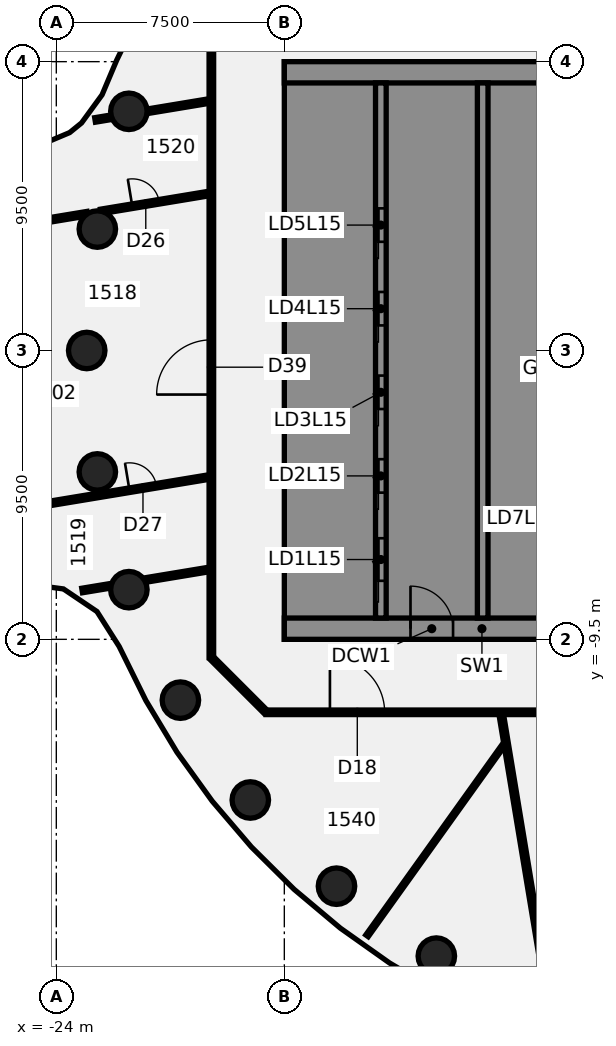
"""IFC4 building model, lengths in metres.
Left out: names, types, materials, properties, quantities, classifications, styles, units other than length and angle.
Written with IfcOpenShell. Run it as: python <this file> out.ifc"""

import sys

from ifc_helpers import new_model, si_unit, direction, frame, frame_2d, origin, origin_2d, place, context, subcontext, project, spatial, polyline, rectangle, circle, outline, extrude, element, fill, save


model = new_model("IFC4")
c1 = context("Model", 3, precision=1e-05, world=origin(), true_north=direction((0.0, 1.0)))
c2 = subcontext(c1, "Body", "Model", "MODEL_VIEW")
j1 = project(units=[si_unit("LENGTHUNIT", "METRE"), si_unit("PLANEANGLEUNIT", "RADIAN")], contexts=[c1])
p1 = place(None, origin())
s1 = spatial("IfcSite", under=j1, at=p1, CompositionType="ELEMENT")
p2 = place(p1, origin())
s2 = spatial("IfcBuilding", under=s1, at=p2, CompositionType="ELEMENT")
p3 = place(p2, frame((0.0, 0.0, 67.75)))
s3 = spatial("IfcBuildingStorey", under=s2, at=p3, CompositionType="ELEMENT", Elevation=67.75)
for number, where, z_axis, x_axis in (
    (1, (-21.613, 7.866, -0.14), (0.0, 0.0, 1.0), (1.0, 0.0, 0.0)),
    (2, (-22.651, 3.994, -0.14), (0.0, 0.0, 1.0), (1.0, 0.0, 0.0)),
    (3, (-23.0, 0.0, -0.14), (0.0, 0.0, 1.0), (1.0, 0.0, 0.0)),
    (4, (-22.651, -3.994, -0.14), (0.0, 0.0, 1.0), (1.0, 0.0, 0.0)),
    (5, (-21.613, -7.866, -0.14), (0.0, 0.0, 1.0), (1.0, 0.0, 0.0)),
    (6, (-19.919, -11.5, -0.14), (0.0, 0.0, 1.0), (1.0, 0.0, 0.0)),
    (7, (-17.619, -14.784, -0.14), (0.0, 0.0, 1.0), (1.0, 0.0, 0.0)),
    (8, (-14.784, -17.619, -0.14), (0.0, 0.0, 1.0), (1.0, 0.0, 0.0)),
    (9, (-11.5, -19.919, -0.14), (0.0, 0.0, 1.0), (1.0, 0.0, 0.0)),
):
    element("IfcColumn", number, at=place(p3, frame(where, z_axis=z_axis, x_axis=x_axis)), inside=s3, PredefinedType="COLUMN", context=c2, shape_type="SweptSolid", body=[
        extrude(circle(Radius=0.6, at=origin_2d()), origin(), (0.0, 0.0, 1.0), 3.75),
    ])
p4 = place(p3, frame((-9.365, -11.969, 0.0), z_axis=(0.0, 0.0, 1.0), x_axis=(0.163235943674, -0.986587059865, 0.0)))
e10 = element("IfcWall", 10, at=p4, inside=s3, PredefinedType="PARTITIONING", context=c2, shape_type="SweptSolid", body=[
    extrude(rectangle(XDim=9.158, YDim=0.15, at=frame_2d((4.579, 0.0))), origin(), (0.0, 0.0, 1.0), 3.01),
])
p5 = place(p3, frame((-18.872, -10.128, 0.0), z_axis=(0.0, 0.0, 1.0), x_axis=(0.707106781187, -0.707106781187, 0.0)))
e11 = element("IfcWall", 11, at=p5, inside=s3, PredefinedType="PARTITIONING", context=c2, shape_type="SweptSolid", body=[
    extrude(rectangle(XDim=2.465, YDim=0.15, at=frame_2d((1.232, 0.0))), origin(), (0.0, 0.0, 1.0), 3.01),
])
p6 = place(p3, frame((-17.1, -11.9, 0.0), z_axis=(0.0, 0.0, 1.0), x_axis=(1.0, 0.0, 0.0)))
e12 = element("IfcWall", 12, at=p6, inside=s3, PredefinedType="PARTITIONING", context=c2, shape_type="SweptSolid", body=[
    extrude(rectangle(XDim=34.165, YDim=0.15, at=frame_2d((17.083, 0.0))), origin(), (0.0, 0.0, 1.0), 3.01),
])
p7 = place(p6, frame((14.531, 0.0, 0.0)))
e13 = element("IfcOpeningElement", 13, at=p7, cuts=e12, PredefinedType="OPENING", context=c2, shape_type="SweptSolid", body=[
    extrude(rectangle(XDim=1.8, YDim=2.1, at=frame_2d((0.9, 1.05))), frame((0.0, 0.085, 0.0), z_axis=(0.0, -1.0, 0.0), x_axis=(1.0, 0.0, 0.0)), (0.0, 0.0, 1.0), 0.17),
])
p8 = place(p6, frame((2.1, 0.0, 0.0)))
e14 = element("IfcOpeningElement", 14, at=p8, cuts=e12, PredefinedType="OPENING", context=c2, shape_type="SweptSolid", body=[
    extrude(rectangle(XDim=1.8, YDim=2.1, at=frame_2d((0.9, 1.05))), frame((0.0, 0.085, 0.0), z_axis=(0.0, -1.0, 0.0), x_axis=(1.0, 0.0, 0.0)), (0.0, 0.0, 1.0), 0.17),
])
p9 = place(p6, frame((27.481, 0.0, 0.0)))
e15 = element("IfcOpeningElement", 15, at=p9, cuts=e12, PredefinedType="OPENING", context=c2, shape_type="SweptSolid", body=[
    extrude(rectangle(XDim=1.8, YDim=2.1, at=frame_2d((0.9, 1.05))), frame((0.0, 0.085, 0.0), z_axis=(0.0, -1.0, 0.0), x_axis=(1.0, 0.0, 0.0)), (0.0, 0.0, 1.0), 0.17),
])
p10 = place(p3, frame((-26.401, 3.933, 0.0), z_axis=(0.0, 0.0, 1.0), x_axis=(0.986558825421, 0.163406499212, 0.0)))
e16 = element("IfcWall", 16, at=p10, inside=s3, PredefinedType="PARTITIONING", context=c2, shape_type="SweptSolid", body=[
    extrude(rectangle(XDim=3.471, YDim=0.15, at=frame_2d((1.735, 0.0))), origin(), (0.0, 0.0, 1.0), 3.01),
])
p11 = place(p3, frame((-22.537, 4.573, 0.0), z_axis=(0.0, 0.0, 1.0), x_axis=(0.986555814716, 0.163424675158, 0.0)))
e17 = element("IfcWall", 17, at=p11, inside=s3, PredefinedType="PARTITIONING", context=c2, shape_type="SweptSolid", body=[
    extrude(rectangle(XDim=3.617, YDim=0.15, at=frame_2d((1.808, 0.0))), origin(), (0.0, 0.0, 1.0), 3.01),
])
p12 = place(p11, frame((1.05, 0.0, 0.0)))
e18 = element("IfcOpeningElement", 18, at=p12, cuts=e17, PredefinedType="OPENING", context=c2, shape_type="SweptSolid", body=[
    extrude(rectangle(XDim=0.9, YDim=2.1, at=frame_2d((0.45, 1.05))), frame((0.0, 0.085, 0.0), z_axis=(0.0, -1.0, 0.0), x_axis=(1.0, 0.0, 0.0)), (0.0, 0.0, 1.0), 0.17),
])
p13 = place(p3, frame((-24.898, -5.143, 0.0), z_axis=(0.0, 0.0, 1.0), x_axis=(0.986555931678, 0.163423969083, 0.0)))
e19 = element("IfcWall", 19, at=p13, inside=s3, PredefinedType="PARTITIONING", context=c2, shape_type="SweptSolid", body=[
    extrude(rectangle(XDim=6.01, YDim=0.15, at=frame_2d((3.005, 0.0))), origin(), (0.0, 0.0, 1.0), 3.01),
])
p14 = place(p13, frame((3.35, 0.0, 0.0)))
e20 = element("IfcOpeningElement", 20, at=p14, cuts=e19, PredefinedType="OPENING", context=c2, shape_type="SweptSolid", body=[
    extrude(rectangle(XDim=0.9, YDim=2.1, at=frame_2d((0.45, 1.05))), frame((0.0, 0.085, 0.0), z_axis=(0.0, -1.0, 0.0), x_axis=(1.0, 0.0, 0.0)), (0.0, 0.0, 1.0), 0.17),
])
p15 = place(p3, frame((-23.151, -7.894, 0.0), z_axis=(0.0, 0.0, 1.0), x_axis=(0.986582475576, 0.163263648391, 0.0)))
e21 = element("IfcWall", 21, at=p15, inside=s3, PredefinedType="PARTITIONING", context=c2, shape_type="SweptSolid", body=[
    extrude(rectangle(XDim=0.977, YDim=0.15, at=frame_2d((0.488, 0.0))), origin(), (0.0, 0.0, 1.0), 3.01),
])
p16 = place(p3, frame((-21.093, -7.553, 0.0), z_axis=(0.0, 0.0, 1.0), x_axis=(0.986577198117, 0.16329553624, 0.0)))
e22 = element("IfcWall", 22, at=p16, inside=s3, PredefinedType="PARTITIONING", context=c2, shape_type="SweptSolid", body=[
    extrude(rectangle(XDim=2.153, YDim=0.15, at=frame_2d((1.076, 0.0))), origin(), (0.0, 0.0, 1.0), 3.01),
])
p17 = place(p3, frame((-22.725, 7.583, 0.0), z_axis=(0.0, 0.0, 1.0), x_axis=(0.986534635248, 0.163552479212, 0.0)))
e23 = element("IfcWall", 23, at=p17, inside=s3, PredefinedType="PARTITIONING", context=c2, shape_type="SweptSolid", body=[
    extrude(rectangle(XDim=0.561, YDim=0.15, at=frame_2d((0.281, 0.0))), origin(), (0.0, 0.0, 1.0), 3.01),
])
p18 = place(p3, frame((-21.003, 7.868, 0.0), z_axis=(0.0, 0.0, 1.0), x_axis=(0.986543898424, 0.163496594711, 0.0)))
e24 = element("IfcWall", 24, at=p18, inside=s3, PredefinedType="PARTITIONING", context=c2, shape_type="SweptSolid", body=[
    extrude(rectangle(XDim=2.062, YDim=0.15, at=frame_2d((1.031, 0.0))), origin(), (0.0, 0.0, 1.0), 3.01),
])
p19 = place(p3, frame((-13.78, -19.251, 0.0), z_axis=(0.0, 0.0, 1.0), x_axis=(0.582043843028, 0.813157404685, 0.0)))
e25 = element("IfcWall", 25, at=p19, inside=s3, PredefinedType="PARTITIONING", context=c2, shape_type="SweptSolid", body=[
    extrude(rectangle(XDim=7.708, YDim=0.1, at=frame_2d((3.854, 0.0))), origin(), (0.0, 0.0, 1.0), 3.01),
])
p20 = place(p3, frame((-18.9, -10.1, 0.0), z_axis=(0.0, 0.0, 1.0), x_axis=(0.0, 1.0, 0.0)))
e26 = element("IfcWall", 26, at=p20, inside=s3, PredefinedType="PARTITIONING", context=c2, shape_type="SweptSolid", body=[
    extrude(rectangle(XDim=20.2, YDim=0.15, at=frame_2d((10.1, 0.0))), origin(), (0.0, 0.0, 1.0), 3.01),
])
p21 = place(p20, frame((8.651, 0.0, 0.0)))
e27 = element("IfcOpeningElement", 27, at=p21, cuts=e26, PredefinedType="OPENING", context=c2, shape_type="SweptSolid", body=[
    extrude(rectangle(XDim=1.8, YDim=2.1, at=frame_2d((0.9, 1.05))), frame((0.0, 0.085, 0.0), z_axis=(0.0, -1.0, 0.0), x_axis=(1.0, 0.0, 0.0)), (0.0, 0.0, 1.0), 0.17),
])
p22 = place(p3, frame((-16.5, -9.15, 0.0), z_axis=(0.0, 0.0, 1.0), x_axis=(1.0, 0.0, 0.0)))
e28 = element("IfcWall", 28, at=p22, inside=s3, PredefinedType="SHEAR", context=c2, shape_type="SweptSolid", body=[
    extrude(rectangle(XDim=13.0, YDim=0.7, at=frame_2d((6.5, 0.0))), origin(), (0.0, 0.0, 1.0), 3.61),
])
p23 = place(p22, frame((4.15, 0.0, 0.0)))
e29 = element("IfcOpeningElement", 29, at=p23, cuts=e28, PredefinedType="OPENING", context=c2, shape_type="SweptSolid", body=[
    extrude(rectangle(XDim=1.4, YDim=2.1, at=frame_2d((0.7, 1.05))), frame((0.0, 0.36, 0.0), z_axis=(0.0, -1.0, 0.0), x_axis=(1.0, 0.0, 0.0)), (0.0, 0.0, 1.0), 0.72),
])
p24 = place(p22, frame((10.125, 0.0, 0.0)))
e30 = element("IfcOpeningElement", 30, at=p24, cuts=e28, PredefinedType="OPENING", context=c2, shape_type="SweptSolid", body=[
    extrude(rectangle(XDim=1.4, YDim=2.1, at=frame_2d((0.7, 1.05))), frame((0.0, 0.36, 0.0), z_axis=(0.0, -1.0, 0.0), x_axis=(1.0, 0.0, 0.0)), (0.0, 0.0, 1.0), 0.72),
])
p25 = place(p3, origin())
e31 = element("IfcWall", 31, at=p25, inside=s3, PredefinedType="SHEAR", context=c2, shape_type="SweptSolid", body=[
    extrude(outline(polyline([(-13.5, -8.8), (-13.5, -8.125), (-15.8, -8.125), (-15.8, -5.625), (-13.5, -5.625), (-13.5, -5.375), (-15.8, -5.375), (-15.8, -2.875), (-13.5, -2.875), (-13.5, -2.625), (-15.8, -2.625), (-15.8, -0.125), (-13.5, -0.125), (-13.5, 0.125), (-15.8, 0.125), (-15.8, 2.625), (-13.5, 2.625), (-13.5, 2.875), (-15.8, 2.875), (-15.8, 5.375), (-13.5, 5.375), (-13.5, 5.625), (-15.8, 5.625), (-15.8, 8.125), (-13.5, 8.125), (-13.5, 8.8), (-15.8, 8.8), (-16.5, 8.8), (-16.5, -8.8), (-15.8, -8.8), (-13.5, -8.8)])), origin(), (0.0, 0.0, 1.0), 3.61),
])
p26 = place(p3, frame((-16.5, 9.15, 0.0), z_axis=(0.0, 0.0, 1.0), x_axis=(1.0, 0.0, 0.0)))
e32 = element("IfcWall", 32, at=p26, inside=s3, PredefinedType="SHEAR", context=c2, shape_type="SweptSolid", body=[
    extrude(rectangle(XDim=13.0, YDim=0.7, at=frame_2d((6.5, 0.0))), origin(), (0.0, 0.0, 1.0), 3.61),
])
p27 = place(p3, origin())
e33 = element("IfcWall", 33, at=p27, inside=s3, PredefinedType="SHEAR", context=c2, shape_type="SweptSolid", body=[
    extrude(outline(polyline([(-9.8, -5.375), (-9.8, -5.625), (-7.5, -5.625), (-7.15, -5.625), (-7.15, 8.8), (-7.5, 8.8), (-9.8, 8.8), (-9.8, 8.125), (-7.5, 8.125), (-7.5, 5.625), (-9.8, 5.625), (-9.8, 5.375), (-7.5, 5.375), (-7.5, 2.875), (-9.8, 2.875), (-9.8, 2.625), (-7.5, 2.625), (-7.5, 0.125), (-9.8, 0.125), (-9.8, -0.125), (-7.5, -0.125), (-7.5, -2.625), (-9.8, -2.625), (-9.8, -2.875), (-7.5, -2.875), (-7.5, -5.375), (-9.8, -5.375)])), origin(), (0.0, 0.0, 1.0), 3.61),
])
p28 = place(p3, origin())
e34 = element("IfcWall", 34, at=p28, inside=s3, PredefinedType="SHEAR", context=c2, shape_type="SweptSolid", body=[
    extrude(outline(polyline([(-7.5, -8.125), (-9.55, -8.125), (-9.55, -5.625), (-9.8, -5.625), (-9.8, -8.125), (-9.8, -8.8), (-7.5, -8.8), (-7.5, -8.125)])), origin(), (0.0, 0.0, 1.0), 3.61),
])
p29 = place(p3, frame((-13.325, -8.8, 0.0), z_axis=(0.0, 0.0, 1.0), x_axis=(0.0, 1.0, 0.0)))
e35 = element("IfcWall", 35, at=p29, inside=s3, PredefinedType="SHEAR", context=c2, shape_type="SweptSolid", body=[
    extrude(rectangle(XDim=17.6, YDim=0.35, at=frame_2d((8.8, 0.0))), origin(), (0.0, 0.0, 1.0), 3.61),
])
p30 = place(p29, frame((1.225, 0.0, 0.0)))
e36 = element("IfcOpeningElement", 36, at=p30, cuts=e35, PredefinedType="OPENING", context=c2, shape_type="SweptSolid", body=[
    extrude(rectangle(XDim=1.4, YDim=2.1, at=frame_2d((0.7, 1.05))), frame((0.0, 0.185, 0.0), z_axis=(0.0, -1.0, 0.0), x_axis=(1.0, 0.0, 0.0)), (0.0, 0.0, 1.0), 0.37),
])
p31 = place(p29, frame((4.125, 0.0, 0.0)))
e37 = element("IfcOpeningElement", 37, at=p31, cuts=e35, PredefinedType="OPENING", context=c2, shape_type="SweptSolid", body=[
    extrude(rectangle(XDim=1.1, YDim=2.1, at=frame_2d((0.55, 1.05))), frame((0.0, 0.185, 0.0), z_axis=(0.0, -1.0, 0.0), x_axis=(1.0, 0.0, 0.0)), (0.0, 0.0, 1.0), 0.37),
])
p32 = place(p29, frame((6.875, 0.0, 0.0)))
e38 = element("IfcOpeningElement", 38, at=p32, cuts=e35, PredefinedType="OPENING", context=c2, shape_type="SweptSolid", body=[
    extrude(rectangle(XDim=1.1, YDim=2.1, at=frame_2d((0.55, 1.05))), frame((0.0, 0.185, 0.0), z_axis=(0.0, -1.0, 0.0), x_axis=(1.0, 0.0, 0.0)), (0.0, 0.0, 1.0), 0.37),
])
p33 = place(p29, frame((9.625, 0.0, 0.0)))
e39 = element("IfcOpeningElement", 39, at=p33, cuts=e35, PredefinedType="OPENING", context=c2, shape_type="SweptSolid", body=[
    extrude(rectangle(XDim=1.1, YDim=2.1, at=frame_2d((0.55, 1.05))), frame((0.0, 0.185, 0.0), z_axis=(0.0, -1.0, 0.0), x_axis=(1.0, 0.0, 0.0)), (0.0, 0.0, 1.0), 0.37),
])
p34 = place(p29, frame((12.375, 0.0, 0.0)))
e40 = element("IfcOpeningElement", 40, at=p34, cuts=e35, PredefinedType="OPENING", context=c2, shape_type="SweptSolid", body=[
    extrude(rectangle(XDim=1.1, YDim=2.1, at=frame_2d((0.55, 1.05))), frame((0.0, 0.185, 0.0), z_axis=(0.0, -1.0, 0.0), x_axis=(1.0, 0.0, 0.0)), (0.0, 0.0, 1.0), 0.37),
])
p35 = place(p3, frame((-9.975, -8.8, 0.0), z_axis=(0.0, 0.0, 1.0), x_axis=(0.0, 1.0, 0.0)))
e41 = element("IfcWall", 41, at=p35, inside=s3, PredefinedType="SHEAR", context=c2, shape_type="SweptSolid", body=[
    extrude(rectangle(XDim=17.6, YDim=0.35, at=frame_2d((8.8, 0.0))), origin(), (0.0, 0.0, 1.0), 3.61),
])
p36 = place(p8, frame((1.8, 0.0, 0.0), z_axis=(0.0, 0.0, 1.0), x_axis=(-1.0, 0.0, 0.0)))
e42 = element("IfcDoor", 42, at=p36, inside=s3, OperationType="DOUBLE_DOOR_SINGLE_SWING", PredefinedType="DOOR", context=c2, shape_type="SweptSolid", body=[
    extrude(rectangle(XDim=1.8, YDim=2.1, at=frame_2d((0.9, 1.05))), frame((0.0, 0.025, 0.0), z_axis=(0.0, -1.0, 0.0), x_axis=(1.0, 0.0, 0.0)), (0.0, 0.0, 1.0), 0.05),
])
fill(e14, e42)
p37 = place(p12, origin())
e43 = element("IfcDoor", 43, at=p37, inside=s3, OperationType="SINGLE_SWING_RIGHT", PredefinedType="DOOR", context=c2, shape_type="SweptSolid", body=[
    extrude(rectangle(XDim=0.9, YDim=2.1, at=frame_2d((0.45, 1.05))), frame((0.0, 0.025, 0.0), z_axis=(0.0, -1.0, 0.0), x_axis=(1.0, 0.0, 0.0)), (0.0, 0.0, 1.0), 0.05),
])
fill(e18, e43)
p38 = place(p14, frame((0.9, 0.0, 0.0), z_axis=(0.0, 0.0, 1.0), x_axis=(-1.0, 0.0, 0.0)))
e44 = element("IfcDoor", 44, at=p38, inside=s3, OperationType="SINGLE_SWING_RIGHT", PredefinedType="DOOR", context=c2, shape_type="SweptSolid", body=[
    extrude(rectangle(XDim=0.9, YDim=2.1, at=frame_2d((0.45, 1.05))), frame((0.0, 0.025, 0.0), z_axis=(0.0, -1.0, 0.0), x_axis=(1.0, 0.0, 0.0)), (0.0, 0.0, 1.0), 0.05),
])
fill(e20, e44)
p39 = place(p21, frame((1.8, 0.0, 0.0), z_axis=(0.0, 0.0, 1.0), x_axis=(-1.0, 0.0, 0.0)))
e45 = element("IfcDoor", 45, at=p39, inside=s3, OperationType="DOUBLE_DOOR_SINGLE_SWING", PredefinedType="DOOR", context=c2, shape_type="SweptSolid", body=[
    extrude(rectangle(XDim=1.8, YDim=2.1, at=frame_2d((0.9, 1.05))), frame((0.0, 0.025, 0.0), z_axis=(0.0, -1.0, 0.0), x_axis=(1.0, 0.0, 0.0)), (0.0, 0.0, 1.0), 0.05),
])
fill(e27, e45)
p40 = place(p23, origin())
e46 = element("IfcDoor", 46, at=p40, inside=s3, OperationType="SINGLE_SWING_LEFT", PredefinedType="DOOR", context=c2, shape_type="SweptSolid", body=[
    extrude(rectangle(XDim=1.4, YDim=2.1, at=frame_2d((0.7, 1.05))), frame((0.0, 0.025, 0.0), z_axis=(0.0, -1.0, 0.0), x_axis=(1.0, 0.0, 0.0)), (0.0, 0.0, 1.0), 0.05),
])
fill(e29, e46)
p41 = place(p30, origin())
e47 = element("IfcDoor", 47, at=p41, inside=s3, OperationType="SLIDING_TO_LEFT", PredefinedType="DOOR", context=c2, shape_type="SweptSolid", body=[
    extrude(rectangle(XDim=1.4, YDim=2.1, at=frame_2d((0.7, 1.05))), frame((0.0, 0.025, 0.0), z_axis=(0.0, -1.0, 0.0), x_axis=(1.0, 0.0, 0.0)), (0.0, 0.0, 1.0), 0.05),
])
fill(e36, e47)
p42 = place(p31, origin())
e48 = element("IfcDoor", 48, at=p42, inside=s3, OperationType="SLIDING_TO_LEFT", PredefinedType="DOOR", context=c2, shape_type="SweptSolid", body=[
    extrude(rectangle(XDim=1.1, YDim=2.1, at=frame_2d((0.55, 1.05))), frame((0.0, 0.025, 0.0), z_axis=(0.0, -1.0, 0.0), x_axis=(1.0, 0.0, 0.0)), (0.0, 0.0, 1.0), 0.05),
])
fill(e37, e48)
p43 = place(p32, origin())
e49 = element("IfcDoor", 49, at=p43, inside=s3, OperationType="SLIDING_TO_LEFT", PredefinedType="DOOR", context=c2, shape_type="SweptSolid", body=[
    extrude(rectangle(XDim=1.1, YDim=2.1, at=frame_2d((0.55, 1.05))), frame((0.0, 0.025, 0.0), z_axis=(0.0, -1.0, 0.0), x_axis=(1.0, 0.0, 0.0)), (0.0, 0.0, 1.0), 0.05),
])
fill(e38, e49)
p44 = place(p33, origin())
e50 = element("IfcDoor", 50, at=p44, inside=s3, OperationType="SLIDING_TO_LEFT", PredefinedType="DOOR", context=c2, shape_type="SweptSolid", body=[
    extrude(rectangle(XDim=1.1, YDim=2.1, at=frame_2d((0.55, 1.05))), frame((0.0, 0.025, 0.0), z_axis=(0.0, -1.0, 0.0), x_axis=(1.0, 0.0, 0.0)), (0.0, 0.0, 1.0), 0.05),
])
fill(e39, e50)
p45 = place(p34, origin())
e51 = element("IfcDoor", 51, at=p45, inside=s3, OperationType="SLIDING_TO_LEFT", PredefinedType="DOOR", context=c2, shape_type="SweptSolid", body=[
    extrude(rectangle(XDim=1.1, YDim=2.1, at=frame_2d((0.55, 1.05))), frame((0.0, 0.025, 0.0), z_axis=(0.0, -1.0, 0.0), x_axis=(1.0, 0.0, 0.0)), (0.0, 0.0, 1.0), 0.05),
])
fill(e40, e51)
save(model, sys.argv[1])
